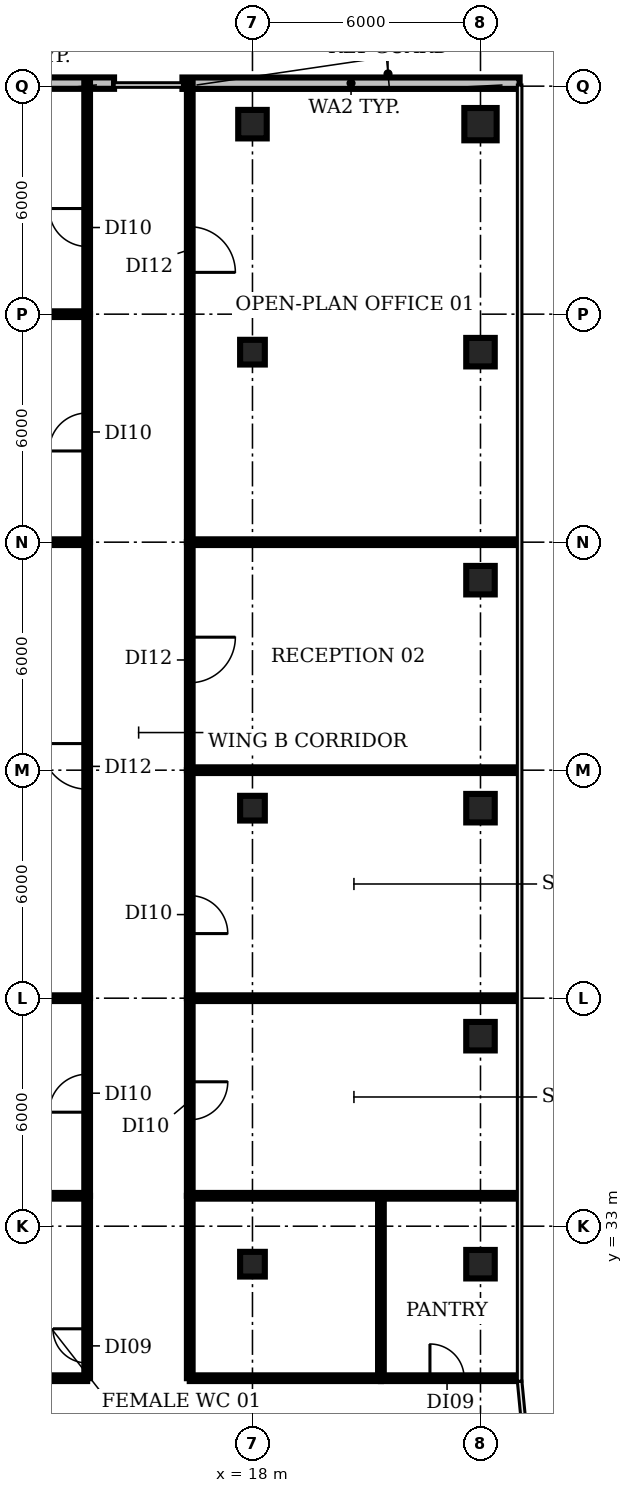
"""IFC4 building model, lengths in metres.
Left out: names, types, materials, properties, quantities, classifications, styles, units other than length and angle.
Written with IfcOpenShell. Run it as: python <this file> out.ifc"""

import sys

from ifc_helpers import new_model, si_unit, direction, frame, frame_2d, origin, origin_2d, place, context, subcontext, project, spatial, rectangle, circle, extrude, element, fill, save


model = new_model("IFC4")
c1 = context("Model", 3, precision=1e-05, world=origin(), true_north=direction((0.0, 1.0)))
c2 = subcontext(c1, "Body", "Model", "MODEL_VIEW")
j1 = project(units=[si_unit("LENGTHUNIT", "METRE"), si_unit("PLANEANGLEUNIT", "RADIAN")], contexts=[c1])
p1 = place(None, origin())
s1 = spatial("IfcSite", under=j1, at=p1, CompositionType="ELEMENT")
p2 = place(p1, origin())
s2 = spatial("IfcBuilding", under=s1, at=p2, CompositionType="ELEMENT")
p3 = place(p2, frame((0.0, 0.0, 310.4)))
s3 = spatial("IfcBuildingStorey", under=s2, at=p3, CompositionType="ELEMENT", Elevation=310.4)
for number, where, z_axis, x_axis in (
    (1, (18.0, 32.0, 0.0), (0.0, 0.0, 1.0), (1.0, 0.0, 0.0)),
    (2, (18.0, 44.0, 0.0), (0.0, 0.0, 1.0), (1.0, 0.0, 0.0)),
    (3, (18.0, 56.0, 0.0), (0.0, 0.0, 1.0), (1.0, 0.0, 0.0)),
):
    element("IfcColumn", number, at=place(p3, frame(where, z_axis=z_axis, x_axis=x_axis)), inside=s3, PredefinedType="COLUMN", context=c2, shape_type="SweptSolid", body=[
        extrude(rectangle(XDim=0.65, YDim=0.65, at=origin_2d()), origin(), (0.0, 0.0, 1.0), 3.9),
    ])
for number, where, z_axis, x_axis in (
    (4, (18.0, 62.0, 0.0), (0.0, 0.0, 1.0), (1.0, 0.0, 0.0)),
    (5, (24.0, 32.0, 0.0), (0.0, 0.0, 1.0), (1.0, 0.0, 0.0)),
    (6, (24.0, 38.0, 0.0), (0.0, 0.0, 1.0), (1.0, 0.0, 0.0)),
    (7, (24.0, 44.0, 0.0), (0.0, 0.0, 1.0), (1.0, 0.0, 0.0)),
    (8, (24.0, 50.0, 0.0), (0.0, 0.0, 1.0), (1.0, 0.0, 0.0)),
    (9, (24.0, 56.0, 0.0), (0.0, 0.0, 1.0), (1.0, 0.0, 0.0)),
):
    element("IfcColumn", number, at=place(p3, frame(where, z_axis=z_axis, x_axis=x_axis)), inside=s3, PredefinedType="COLUMN", context=c2, shape_type="SweptSolid", body=[
        extrude(rectangle(XDim=0.75, YDim=0.75, at=origin_2d()), origin(), (0.0, 0.0, 1.0), 3.9),
    ])
p4 = place(p3, frame((24.0, 62.0, 0.0), z_axis=(0.0, 0.0, 1.0), x_axis=(1.0, 0.0, 0.0)))
e10 = element("IfcColumn", 10, at=p4, inside=s3, PredefinedType="COLUMN", context=c2, shape_type="SweptSolid", body=[
    extrude(circle(Radius=0.425, at=origin_2d()), origin(), (0.0, 0.0, 1.0), 3.9),
])
p5 = place(p3, frame((25.03, 63.078, 0.0), z_axis=(0.0, 0.0, 1.0), x_axis=(-1.0, 0.0, 0.0)))
e11 = element("IfcWall", 11, at=p5, inside=s3, PredefinedType="SOLIDWALL", context=c2, shape_type="SweptSolid", body=[
    extrude(rectangle(XDim=8.873, YDim=0.3, at=frame_2d((4.436, 0.0))), origin(), (0.0, 0.0, 1.0), 3.9),
])
p6 = place(p3, frame((14.357, 63.08, 0.0), z_axis=(0.0, 0.0, 1.0), x_axis=(-1.0, 0.0, 0.0)))
e12 = element("IfcWall", 12, at=p6, inside=s3, PredefinedType="SOLIDWALL", context=c2, shape_type="SweptSolid", body=[
    extrude(rectangle(XDim=4.715, YDim=0.3, at=frame_2d((2.357, 0.0))), origin(), (0.0, 0.0, 1.0), 3.9),
])
p7 = place(p3, frame((-3.8, 57.0, 0.0), z_axis=(0.0, 0.0, 1.0), x_axis=(1.0, 0.0, 0.0)))
e13 = element("IfcWall", 13, at=p7, inside=s3, PredefinedType="PARTITIONING", context=c2, shape_type="SweptSolid", body=[
    extrude(rectangle(XDim=17.45, YDim=0.15, at=frame_2d((8.725, 0.0))), origin(), (0.0, 0.0, 1.0), 2.48),
])
p8 = place(p3, frame((-3.23, 51.0, 0.0), z_axis=(0.0, 0.0, 1.0), x_axis=(1.0, 0.0, 0.0)))
e14 = element("IfcWall", 14, at=p8, inside=s3, PredefinedType="PARTITIONING", context=c2, shape_type="SweptSolid", body=[
    extrude(rectangle(XDim=16.88, YDim=0.15, at=frame_2d((8.44, 0.0))), origin(), (0.0, 0.0, 1.0), 2.48),
])
p9 = place(p3, frame((-2.049, 39.0, 0.0), z_axis=(0.0, 0.0, 1.0), x_axis=(1.0, 0.0, 0.0)))
e15 = element("IfcWall", 15, at=p9, inside=s3, PredefinedType="PARTITIONING", context=c2, shape_type="SweptSolid", body=[
    extrude(rectangle(XDim=15.698, YDim=0.15, at=frame_2d((7.849, 0.0))), origin(), (0.0, 0.0, 1.0), 2.48),
])
p10 = place(p3, frame((-1.57, 33.8, 0.0), z_axis=(0.0, 0.0, 1.0), x_axis=(1.0, 0.0, 0.0)))
e16 = element("IfcWall", 16, at=p10, inside=s3, PredefinedType="PARTITIONING", context=c2, shape_type="SweptSolid", body=[
    extrude(rectangle(XDim=15.22, YDim=0.15, at=frame_2d((7.61, 0.0))), origin(), (0.0, 0.0, 1.0), 2.48),
])
p11 = place(p3, frame((8.8, 29.0, 0.0), z_axis=(0.0, 0.0, 1.0), x_axis=(1.0, 0.0, 0.0)))
e17 = element("IfcWall", 17, at=p11, inside=s3, PredefinedType="PARTITIONING", context=c2, shape_type="SweptSolid", body=[
    extrude(rectangle(XDim=4.85, YDim=0.15, at=frame_2d((2.425, 0.0))), origin(), (0.0, 0.0, 1.0), 2.48),
])
p12 = place(p3, frame((13.65, 29.0, 0.0), z_axis=(0.0, 0.0, 1.0), x_axis=(0.0, 1.0, 0.0)))
e18 = element("IfcWall", 18, at=p12, inside=s3, PredefinedType="PARTITIONING", context=c2, shape_type="SweptSolid", body=[
    extrude(rectangle(XDim=4.8, YDim=0.15, at=frame_2d((2.4, 0.0))), origin(), (0.0, 0.0, 1.0), 2.48),
])
p13 = place(p12, frame((0.4, 0.0, 0.0)))
e19 = element("IfcOpeningElement", 19, at=p13, cuts=e18, PredefinedType="OPENING", context=c2, shape_type="SweptSolid", body=[
    extrude(rectangle(XDim=0.9, YDim=2.1, at=frame_2d((0.45, 1.05))), frame((0.0, 0.085, 0.0), z_axis=(0.0, -1.0, 0.0), x_axis=(1.0, 0.0, 0.0)), (0.0, 0.0, 1.0), 0.17),
])
p14 = place(p3, frame((13.65, 33.8, 0.0), z_axis=(0.0, 0.0, 1.0), x_axis=(0.0, 1.0, 0.0)))
e20 = element("IfcWall", 20, at=p14, inside=s3, PredefinedType="PARTITIONING", context=c2, shape_type="SweptSolid", body=[
    extrude(rectangle(XDim=5.2, YDim=0.15, at=frame_2d((2.6, 0.0))), origin(), (0.0, 0.0, 1.0), 2.48),
])
p15 = place(p14, frame((2.2, 0.0, 0.0)))
e21 = element("IfcOpeningElement", 21, at=p15, cuts=e20, PredefinedType="OPENING", context=c2, shape_type="SweptSolid", body=[
    extrude(rectangle(XDim=1.0, YDim=2.1, at=frame_2d((0.5, 1.05))), frame((0.0, 0.085, 0.0), z_axis=(0.0, -1.0, 0.0), x_axis=(1.0, 0.0, 0.0)), (0.0, 0.0, 1.0), 0.17),
])
p16 = place(p3, frame((13.65, 39.0, 0.0), z_axis=(0.0, 0.0, 1.0), x_axis=(0.0, 1.0, 0.0)))
e22 = element("IfcWall", 22, at=p16, inside=s3, PredefinedType="PARTITIONING", context=c2, shape_type="SweptSolid", body=[
    extrude(rectangle(XDim=12.0, YDim=0.15, at=frame_2d((6.0, 0.0))), origin(), (0.0, 0.0, 1.0), 2.48),
])
p17 = place(p16, frame((5.5, 0.0, 0.0)))
e23 = element("IfcOpeningElement", 23, at=p17, cuts=e22, PredefinedType="OPENING", context=c2, shape_type="SweptSolid", body=[
    extrude(rectangle(XDim=1.2, YDim=2.1, at=frame_2d((0.6, 1.05))), frame((0.0, 0.085, 0.0), z_axis=(0.0, -1.0, 0.0), x_axis=(1.0, 0.0, 0.0)), (0.0, 0.0, 1.0), 0.17),
])
p18 = place(p3, frame((13.65, 51.0, 0.0), z_axis=(0.0, 0.0, 1.0), x_axis=(0.0, 1.0, 0.0)))
e24 = element("IfcWall", 24, at=p18, inside=s3, PredefinedType="PARTITIONING", context=c2, shape_type="SweptSolid", body=[
    extrude(rectangle(XDim=6.0, YDim=0.15, at=frame_2d((3.0, 0.0))), origin(), (0.0, 0.0, 1.0), 2.48),
])
p19 = place(p18, frame((2.4, 0.0, 0.0)))
e25 = element("IfcOpeningElement", 25, at=p19, cuts=e24, PredefinedType="OPENING", context=c2, shape_type="SweptSolid", body=[
    extrude(rectangle(XDim=1.0, YDim=2.1, at=frame_2d((0.5, 1.05))), frame((0.0, 0.085, 0.0), z_axis=(0.0, -1.0, 0.0), x_axis=(1.0, 0.0, 0.0)), (0.0, 0.0, 1.0), 0.17),
])
p20 = place(p3, frame((13.65, 57.0, 0.0), z_axis=(0.0, 0.0, 1.0), x_axis=(0.0, 1.0, 0.0)))
e26 = element("IfcWall", 26, at=p20, inside=s3, PredefinedType="PARTITIONING", context=c2, shape_type="SweptSolid", body=[
    extrude(rectangle(XDim=6.09, YDim=0.15, at=frame_2d((3.045, 0.0))), origin(), (0.0, 0.0, 1.0), 2.48),
])
p21 = place(p20, frame((1.78, 0.0, 0.0)))
e27 = element("IfcOpeningElement", 27, at=p21, cuts=e26, PredefinedType="OPENING", context=c2, shape_type="SweptSolid", body=[
    extrude(rectangle(XDim=1.0, YDim=2.1, at=frame_2d((0.5, 1.05))), frame((0.0, 0.085, 0.0), z_axis=(0.0, -1.0, 0.0), x_axis=(1.0, 0.0, 0.0)), (0.0, 0.0, 1.0), 0.17),
])
p22 = place(p3, frame((16.35, 29.0, 0.0), z_axis=(0.0, 0.0, 1.0), x_axis=(0.0, 1.0, 0.0)))
e28 = element("IfcWall", 28, at=p22, inside=s3, PredefinedType="PARTITIONING", context=c2, shape_type="SweptSolid", body=[
    extrude(rectangle(XDim=4.8, YDim=0.15, at=frame_2d((2.4, 0.0))), origin(), (0.0, 0.0, 1.0), 2.48),
])
p23 = place(p3, frame((16.35, 29.0, 0.0), z_axis=(0.0, 0.0, 1.0), x_axis=(1.0, 0.0, 0.0)))
e29 = element("IfcWall", 29, at=p23, inside=s3, PredefinedType="PARTITIONING", context=c2, shape_type="SweptSolid", body=[
    extrude(rectangle(XDim=5.03, YDim=0.15, at=frame_2d((2.515, 0.0))), origin(), (0.0, 0.0, 1.0), 2.48),
])
p24 = place(p3, frame((16.35, 33.8, 0.0), z_axis=(0.0, 0.0, 1.0), x_axis=(1.0, 0.0, 0.0)))
e30 = element("IfcWall", 30, at=p24, inside=s3, PredefinedType="PARTITIONING", context=c2, shape_type="SweptSolid", body=[
    extrude(rectangle(XDim=8.63, YDim=0.15, at=frame_2d((4.315, 0.0))), origin(), (0.0, 0.0, 1.0), 2.48),
])
p25 = place(p3, frame((16.35, 39.0, 0.0), z_axis=(0.0, 0.0, 1.0), x_axis=(0.0, -1.0, 0.0)))
e31 = element("IfcWall", 31, at=p25, inside=s3, PredefinedType="PARTITIONING", context=c2, shape_type="SweptSolid", body=[
    extrude(rectangle(XDim=5.2, YDim=0.15, at=frame_2d((2.6, 0.0))), origin(), (0.0, 0.0, 1.0), 2.48),
])
p26 = place(p25, frame((2.2, 0.0, 0.0)))
e32 = element("IfcOpeningElement", 32, at=p26, cuts=e31, PredefinedType="OPENING", context=c2, shape_type="SweptSolid", body=[
    extrude(rectangle(XDim=1.0, YDim=2.1, at=frame_2d((0.5, 1.05))), frame((0.0, 0.085, 0.0), z_axis=(0.0, -1.0, 0.0), x_axis=(1.0, 0.0, 0.0)), (0.0, 0.0, 1.0), 0.17),
])
p27 = place(p3, frame((16.35, 39.0, 0.0), z_axis=(0.0, 0.0, 1.0), x_axis=(1.0, 0.0, 0.0)))
e33 = element("IfcWall", 33, at=p27, inside=s3, PredefinedType="PARTITIONING", context=c2, shape_type="SweptSolid", body=[
    extrude(rectangle(XDim=8.63, YDim=0.15, at=frame_2d((4.315, 0.0))), origin(), (0.0, 0.0, 1.0), 2.48),
])
p28 = place(p3, frame((16.35, 45.0, 0.0), z_axis=(0.0, 0.0, 1.0), x_axis=(0.0, -1.0, 0.0)))
e34 = element("IfcWall", 34, at=p28, inside=s3, PredefinedType="PARTITIONING", context=c2, shape_type="SweptSolid", body=[
    extrude(rectangle(XDim=6.0, YDim=0.15, at=frame_2d((3.0, 0.0))), origin(), (0.0, 0.0, 1.0), 2.48),
])
p29 = place(p28, frame((3.3, 0.0, 0.0)))
e35 = element("IfcOpeningElement", 35, at=p29, cuts=e34, PredefinedType="OPENING", context=c2, shape_type="SweptSolid", body=[
    extrude(rectangle(XDim=1.0, YDim=2.1, at=frame_2d((0.5, 1.05))), frame((0.0, 0.085, 0.0), z_axis=(0.0, -1.0, 0.0), x_axis=(1.0, 0.0, 0.0)), (0.0, 0.0, 1.0), 0.17),
])
p30 = place(p3, frame((16.35, 45.0, 0.0), z_axis=(0.0, 0.0, 1.0), x_axis=(1.0, 0.0, 0.0)))
e36 = element("IfcWall", 36, at=p30, inside=s3, PredefinedType="PARTITIONING", context=c2, shape_type="SweptSolid", body=[
    extrude(rectangle(XDim=8.63, YDim=0.15, at=frame_2d((4.315, 0.0))), origin(), (0.0, 0.0, 1.0), 2.48),
])
p31 = place(p3, frame((16.35, 51.0, 0.0), z_axis=(0.0, 0.0, 1.0), x_axis=(0.0, -1.0, 0.0)))
e37 = element("IfcWall", 37, at=p31, inside=s3, PredefinedType="PARTITIONING", context=c2, shape_type="SweptSolid", body=[
    extrude(rectangle(XDim=6.0, YDim=0.15, at=frame_2d((3.0, 0.0))), origin(), (0.0, 0.0, 1.0), 2.48),
])
p32 = place(p31, frame((2.5, 0.0, 0.0)))
e38 = element("IfcOpeningElement", 38, at=p32, cuts=e37, PredefinedType="OPENING", context=c2, shape_type="SweptSolid", body=[
    extrude(rectangle(XDim=1.2, YDim=2.1, at=frame_2d((0.6, 1.05))), frame((0.0, 0.085, 0.0), z_axis=(0.0, -1.0, 0.0), x_axis=(1.0, 0.0, 0.0)), (0.0, 0.0, 1.0), 0.17),
])
p33 = place(p3, frame((16.35, 51.0, 0.0), z_axis=(0.0, 0.0, 1.0), x_axis=(1.0, 0.0, 0.0)))
e39 = element("IfcWall", 39, at=p33, inside=s3, PredefinedType="PARTITIONING", context=c2, shape_type="SweptSolid", body=[
    extrude(rectangle(XDim=8.63, YDim=0.15, at=frame_2d((4.315, 0.0))), origin(), (0.0, 0.0, 1.0), 2.48),
])
p34 = place(p3, frame((16.35, 63.09, 0.0), z_axis=(0.0, 0.0, 1.0), x_axis=(0.0, -1.0, 0.0)))
e40 = element("IfcWall", 40, at=p34, inside=s3, PredefinedType="PARTITIONING", context=c2, shape_type="SweptSolid", body=[
    extrude(rectangle(XDim=12.09, YDim=0.15, at=frame_2d((6.045, 0.0))), origin(), (0.0, 0.0, 1.0), 2.48),
])
p35 = place(p34, frame((3.79, 0.0, 0.0)))
e41 = element("IfcOpeningElement", 41, at=p35, cuts=e40, PredefinedType="OPENING", context=c2, shape_type="SweptSolid", body=[
    extrude(rectangle(XDim=1.2, YDim=2.1, at=frame_2d((0.6, 1.05))), frame((0.0, 0.085, 0.0), z_axis=(0.0, -1.0, 0.0), x_axis=(1.0, 0.0, 0.0)), (0.0, 0.0, 1.0), 0.17),
])
p36 = place(p3, frame((21.38, 29.0, 0.0), z_axis=(0.0, 0.0, 1.0), x_axis=(0.0, 1.0, 0.0)))
e42 = element("IfcWall", 42, at=p36, inside=s3, PredefinedType="PARTITIONING", context=c2, shape_type="SweptSolid", body=[
    extrude(rectangle(XDim=4.8, YDim=0.15, at=frame_2d((2.4, 0.0))), origin(), (0.0, 0.0, 1.0), 2.48),
])
p37 = place(p3, frame((21.38, 29.0, 0.0), z_axis=(0.0, 0.0, 1.0), x_axis=(1.0, 0.0, 0.0)))
e43 = element("IfcWall", 43, at=p37, inside=s3, PredefinedType="PARTITIONING", context=c2, shape_type="SweptSolid", body=[
    extrude(rectangle(XDim=3.585, YDim=0.15, at=frame_2d((1.792, 0.0))), origin(), (0.0, 0.0, 1.0), 2.48),
])
p38 = place(p37, frame((1.29, 0.0, 0.0)))
e44 = element("IfcOpeningElement", 44, at=p38, cuts=e43, PredefinedType="OPENING", context=c2, shape_type="SweptSolid", body=[
    extrude(rectangle(XDim=0.9, YDim=2.1, at=frame_2d((0.45, 1.05))), frame((0.0, 0.085, 0.0), z_axis=(0.0, -1.0, 0.0), x_axis=(1.0, 0.0, 0.0)), (0.0, 0.0, 1.0), 0.17),
])
p39 = place(p13, origin())
e45 = element("IfcDoor", 45, at=p39, inside=s3, OperationType="SINGLE_SWING_RIGHT", PredefinedType="DOOR", context=c2, shape_type="SweptSolid", body=[
    extrude(rectangle(XDim=0.9, YDim=2.1, at=frame_2d((0.45, 1.05))), frame((0.0, 0.025, 0.0), z_axis=(0.0, -1.0, 0.0), x_axis=(1.0, 0.0, 0.0)), (0.0, 0.0, 1.0), 0.05),
])
fill(e19, e45)
p40 = place(p15, origin())
e46 = element("IfcDoor", 46, at=p40, inside=s3, OperationType="SINGLE_SWING_LEFT", PredefinedType="DOOR", context=c2, shape_type="SweptSolid", body=[
    extrude(rectangle(XDim=1.0, YDim=2.1, at=frame_2d((0.5, 1.05))), frame((0.0, 0.025, 0.0), z_axis=(0.0, -1.0, 0.0), x_axis=(1.0, 0.0, 0.0)), (0.0, 0.0, 1.0), 0.05),
])
fill(e21, e46)
p41 = place(p17, origin())
e47 = element("IfcDoor", 47, at=p41, inside=s3, OperationType="SINGLE_SWING_RIGHT", PredefinedType="DOOR", context=c2, shape_type="SweptSolid", body=[
    extrude(rectangle(XDim=1.2, YDim=2.1, at=frame_2d((0.6, 1.05))), frame((0.0, 0.025, 0.0), z_axis=(0.0, -1.0, 0.0), x_axis=(1.0, 0.0, 0.0)), (0.0, 0.0, 1.0), 0.05),
])
fill(e23, e47)
p42 = place(p19, origin())
e48 = element("IfcDoor", 48, at=p42, inside=s3, OperationType="SINGLE_SWING_LEFT", PredefinedType="DOOR", context=c2, shape_type="SweptSolid", body=[
    extrude(rectangle(XDim=1.0, YDim=2.1, at=frame_2d((0.5, 1.05))), frame((0.0, 0.025, 0.0), z_axis=(0.0, -1.0, 0.0), x_axis=(1.0, 0.0, 0.0)), (0.0, 0.0, 1.0), 0.05),
])
fill(e25, e48)
p43 = place(p21, origin())
e49 = element("IfcDoor", 49, at=p43, inside=s3, OperationType="SINGLE_SWING_RIGHT", PredefinedType="DOOR", context=c2, shape_type="SweptSolid", body=[
    extrude(rectangle(XDim=1.0, YDim=2.1, at=frame_2d((0.5, 1.05))), frame((0.0, 0.025, 0.0), z_axis=(0.0, -1.0, 0.0), x_axis=(1.0, 0.0, 0.0)), (0.0, 0.0, 1.0), 0.05),
])
fill(e27, e49)
p44 = place(p26, origin())
e50 = element("IfcDoor", 50, at=p44, inside=s3, OperationType="SINGLE_SWING_LEFT", PredefinedType="DOOR", context=c2, shape_type="SweptSolid", body=[
    extrude(rectangle(XDim=1.0, YDim=2.1, at=frame_2d((0.5, 1.05))), frame((0.0, 0.025, 0.0), z_axis=(0.0, -1.0, 0.0), x_axis=(1.0, 0.0, 0.0)), (0.0, 0.0, 1.0), 0.05),
])
fill(e32, e50)
p45 = place(p29, origin())
e51 = element("IfcDoor", 51, at=p45, inside=s3, OperationType="SINGLE_SWING_RIGHT", PredefinedType="DOOR", context=c2, shape_type="SweptSolid", body=[
    extrude(rectangle(XDim=1.0, YDim=2.1, at=frame_2d((0.5, 1.05))), frame((0.0, 0.025, 0.0), z_axis=(0.0, -1.0, 0.0), x_axis=(1.0, 0.0, 0.0)), (0.0, 0.0, 1.0), 0.05),
])
fill(e35, e51)
p46 = place(p32, origin())
e52 = element("IfcDoor", 52, at=p46, inside=s3, OperationType="SINGLE_SWING_LEFT", PredefinedType="DOOR", context=c2, shape_type="SweptSolid", body=[
    extrude(rectangle(XDim=1.2, YDim=2.1, at=frame_2d((0.6, 1.05))), frame((0.0, 0.025, 0.0), z_axis=(0.0, -1.0, 0.0), x_axis=(1.0, 0.0, 0.0)), (0.0, 0.0, 1.0), 0.05),
])
fill(e38, e52)
p47 = place(p35, origin())
e53 = element("IfcDoor", 53, at=p47, inside=s3, OperationType="SINGLE_SWING_RIGHT", PredefinedType="DOOR", context=c2, shape_type="SweptSolid", body=[
    extrude(rectangle(XDim=1.2, YDim=2.1, at=frame_2d((0.6, 1.05))), frame((0.0, 0.025, 0.0), z_axis=(0.0, -1.0, 0.0), x_axis=(1.0, 0.0, 0.0)), (0.0, 0.0, 1.0), 0.05),
])
fill(e41, e53)
p48 = place(p38, origin())
e54 = element("IfcDoor", 54, at=p48, inside=s3, OperationType="SINGLE_SWING_LEFT", PredefinedType="DOOR", context=c2, shape_type="SweptSolid", body=[
    extrude(rectangle(XDim=0.9, YDim=2.1, at=frame_2d((0.45, 1.05))), frame((0.0, 0.025, 0.0), z_axis=(0.0, -1.0, 0.0), x_axis=(1.0, 0.0, 0.0)), (0.0, 0.0, 1.0), 0.05),
])
fill(e44, e54)
save(model, sys.argv[1])
